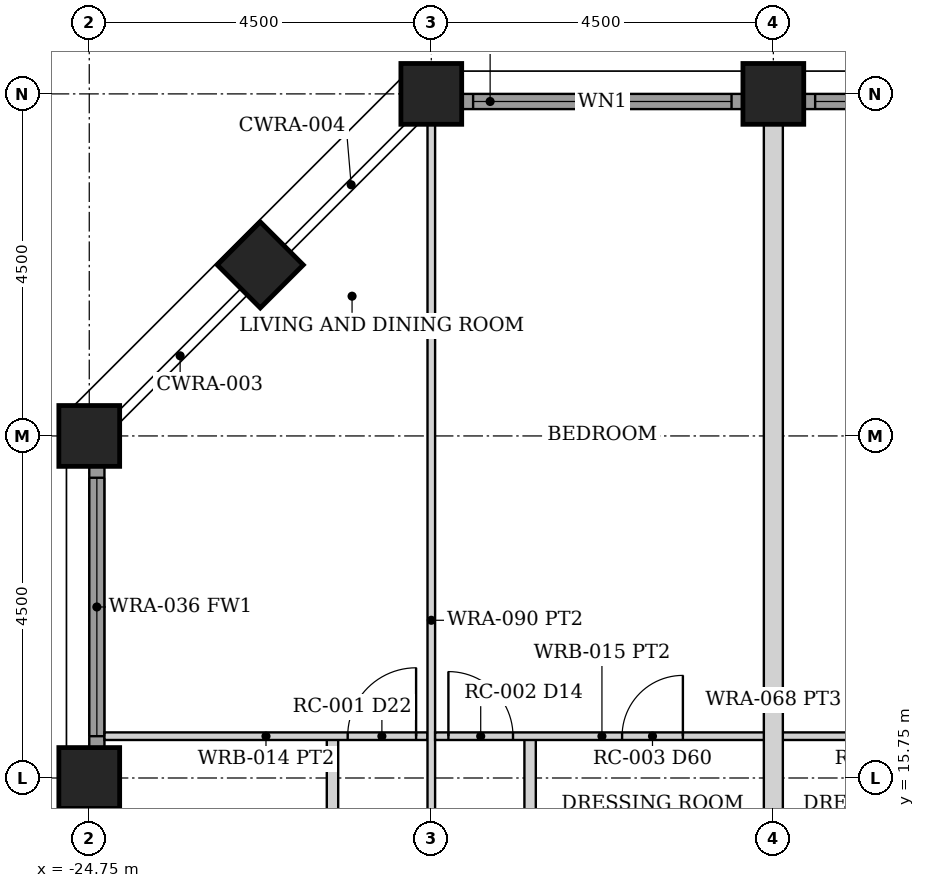
"""IFC4 building model, lengths in metres.
Left out: names, types, materials, properties, quantities, classifications, styles, units other than length and angle.
Written with IfcOpenShell. Run it as: python <this file> out.ifc"""

import sys

from ifc_helpers import new_model, si_unit, direction, frame, frame_2d, origin, origin_2d, place, context, subcontext, project, spatial, rectangle, hollow_rectangle, extrude, element, fill, save


model = new_model("IFC4")
c1 = context("Model", 3, precision=1e-05, world=origin(), true_north=direction((0.0, 1.0)))
c2 = subcontext(c1, "Body", "Model", "MODEL_VIEW")
j1 = project(units=[si_unit("LENGTHUNIT", "METRE"), si_unit("PLANEANGLEUNIT", "RADIAN")], contexts=[c1])
p1 = place(None, origin())
s1 = spatial("IfcSite", under=j1, at=p1, CompositionType="ELEMENT")
p2 = place(p1, origin())
s2 = spatial("IfcBuilding", under=s1, at=p2, CompositionType="ELEMENT")
p3 = place(p2, frame((0.0, 0.0, 47.5)))
s3 = spatial("IfcBuildingStorey", under=s2, at=p3, CompositionType="ELEMENT", Elevation=47.5)
for number, where, z_axis, x_axis in (
    (1, (-20.25, 24.75, 0.0), (0.0, 0.0, 1.0), (0.0, 1.0, 0.0)),
    (2, (-15.75, 24.75, 0.0), (0.0, 0.0, 1.0), (0.0, 1.0, 0.0)),
    (3, (-24.75, 15.75, 0.0), (0.0, 0.0, 1.0), (1.0, 0.0, 0.0)),
    (4, (-24.75, 20.25, 0.0), (0.0, 0.0, 1.0), (1.0, 0.0, 0.0)),
    (5, (-22.5, 22.5, 0.0), (0.0, 0.0, 1.0), (0.707, -0.707, 0.0)),
):
    element("IfcColumn", number, at=place(p3, frame(where, z_axis=z_axis, x_axis=x_axis)), inside=s3, PredefinedType="COLUMN", context=c2, shape_type="SweptSolid", body=[
        extrude(hollow_rectangle(XDim=0.8, YDim=0.8, WallThickness=0.07, at=origin_2d()), origin(), (0.0, 0.0, 1.0), 3.5),
    ])
p4 = place(p3, frame((-19.845, 24.65, 0.0), z_axis=(0.0, 0.0, 1.0), x_axis=(1.0, 0.0, 0.0)))
e6 = element("IfcWall", 6, at=p4, inside=s3, PredefinedType="SOLIDWALL", context=c2, shape_type="SweptSolid", body=[
    extrude(rectangle(XDim=3.69, YDim=0.2, at=frame_2d((1.845, 0.0))), origin(), (0.0, 0.0, 1.0), 2.379),
])
p5 = place(p4, frame((0.145, 0.0, 0.3)))
e7 = element("IfcOpeningElement", 7, at=p5, cuts=e6, PredefinedType="OPENING", context=c2, shape_type="SweptSolid", body=[
    extrude(rectangle(XDim=3.4, YDim=1.929, at=frame_2d((1.7, 0.964))), frame((0.0, 0.11, 0.0), z_axis=(0.0, -1.0, 0.0), x_axis=(1.0, 0.0, 0.0)), (0.0, 0.0, 1.0), 0.22),
])
p6 = place(p3, frame((-15.345, 24.65, 0.0), z_axis=(0.0, 0.0, 1.0), x_axis=(1.0, 0.0, 0.0)))
e8 = element("IfcWall", 8, at=p6, inside=s3, PredefinedType="SOLIDWALL", context=c2, shape_type="SweptSolid", body=[
    extrude(rectangle(XDim=3.69, YDim=0.2, at=frame_2d((1.845, 0.0))), origin(), (0.0, 0.0, 1.0), 2.379),
])
p7 = place(p6, frame((0.145, 0.0, 0.3)))
e9 = element("IfcOpeningElement", 9, at=p7, cuts=e8, PredefinedType="OPENING", context=c2, shape_type="SweptSolid", body=[
    extrude(rectangle(XDim=3.4, YDim=1.929, at=frame_2d((1.7, 0.964))), frame((0.0, 0.11, 0.0), z_axis=(0.0, -1.0, 0.0), x_axis=(1.0, 0.0, 0.0)), (0.0, 0.0, 1.0), 0.22),
])
p8 = place(p3, frame((-24.65, 16.155, 0.0), z_axis=(0.0, 0.0, 1.0), x_axis=(0.0, 1.0, 0.0)))
e10 = element("IfcWall", 10, at=p8, inside=s3, PredefinedType="SOLIDWALL", context=c2, shape_type="SweptSolid", body=[
    extrude(rectangle(XDim=3.69, YDim=0.2, at=frame_2d((1.845, 0.0))), origin(), (0.0, 0.0, 1.0), 2.379),
])
p9 = place(p8, frame((0.145, 0.0, 0.3)))
e11 = element("IfcOpeningElement", 11, at=p9, cuts=e10, PredefinedType="OPENING", context=c2, shape_type="SweptSolid", body=[
    extrude(rectangle(XDim=3.4, YDim=1.929, at=frame_2d((1.7, 0.964))), frame((0.0, 0.11, 0.0), z_axis=(0.0, -1.0, 0.0), x_axis=(1.0, 0.0, 0.0)), (0.0, 0.0, 1.0), 0.22),
])
p10 = place(p3, frame((-21.55, 11.3, 0.0), z_axis=(0.0, 0.0, 1.0), x_axis=(0.0, 1.0, 0.0)))
e12 = element("IfcWall", 12, at=p10, inside=s3, PredefinedType="PARTITIONING", context=c2, shape_type="SweptSolid", body=[
    extrude(rectangle(XDim=5.0, YDim=0.15, at=frame_2d((2.5, 0.0))), origin(), (0.0, 0.0, 1.0), 2.373),
])
p11 = place(p10, frame((2.05, 0.0, 0.0)))
e13 = element("IfcOpeningElement", 13, at=p11, cuts=e12, PredefinedType="OPENING", context=c2, shape_type="SweptSolid", body=[
    extrude(rectangle(XDim=0.9, YDim=2.1, at=frame_2d((0.45, 1.05))), frame((0.0, 0.085, 0.0), z_axis=(0.0, -1.0, 0.0), x_axis=(1.0, 0.0, 0.0)), (0.0, 0.0, 1.0), 0.17),
])
p12 = place(p3, frame((-24.55, 16.3, 0.0), z_axis=(0.0, 0.0, 1.0), x_axis=(1.0, 0.0, 0.0)))
e14 = element("IfcWall", 14, at=p12, inside=s3, PredefinedType="PARTITIONING", context=c2, shape_type="SweptSolid", body=[
    extrude(rectangle(XDim=4.25, YDim=0.1, at=frame_2d((2.125, 0.0))), origin(), (0.0, 0.0, 1.0), 2.373),
])
p13 = place(p12, frame((3.2, 0.0, 0.0)))
e15 = element("IfcOpeningElement", 15, at=p13, cuts=e14, PredefinedType="OPENING", context=c2, shape_type="SweptSolid", body=[
    extrude(rectangle(XDim=0.9, YDim=2.1, at=frame_2d((0.45, 1.05))), frame((0.0, 0.06, 0.0), z_axis=(0.0, -1.0, 0.0), x_axis=(1.0, 0.0, 0.0)), (0.0, 0.0, 1.0), 0.12),
])
p14 = place(p3, frame((-20.25, 11.3, 0.0), z_axis=(0.0, 0.0, 1.0), x_axis=(0.0, 1.0, 0.0)))
e16 = element("IfcWall", 16, at=p14, inside=s3, PredefinedType="PARTITIONING", context=c2, shape_type="SweptSolid", body=[
    extrude(rectangle(XDim=13.05, YDim=0.1, at=frame_2d((6.525, 0.0))), origin(), (0.0, 0.0, 1.0), 2.373),
])
p15 = place(p3, frame((-18.95, 11.3, 0.0), z_axis=(0.0, 0.0, 1.0), x_axis=(0.0, 1.0, 0.0)))
e17 = element("IfcWall", 17, at=p15, inside=s3, PredefinedType="PARTITIONING", context=c2, shape_type="SweptSolid", body=[
    extrude(rectangle(XDim=5.0, YDim=0.15, at=frame_2d((2.5, 0.0))), origin(), (0.0, 0.0, 1.0), 2.373),
])
p16 = place(p15, frame((0.85, 0.0, 0.0)))
e18 = element("IfcOpeningElement", 18, at=p16, cuts=e17, PredefinedType="OPENING", context=c2, shape_type="SweptSolid", body=[
    extrude(rectangle(XDim=0.9, YDim=2.1, at=frame_2d((0.45, 1.05))), frame((0.0, 0.085, 0.0), z_axis=(0.0, -1.0, 0.0), x_axis=(1.0, 0.0, 0.0)), (0.0, 0.0, 1.0), 0.17),
])
p17 = place(p3, frame((-20.2, 16.3, 0.0), z_axis=(0.0, 0.0, 1.0), x_axis=(1.0, 0.0, 0.0)))
e19 = element("IfcWall", 19, at=p17, inside=s3, PredefinedType="PARTITIONING", context=c2, shape_type="SweptSolid", body=[
    extrude(rectangle(XDim=4.39, YDim=0.1, at=frame_2d((2.195, 0.0))), origin(), (0.0, 0.0, 1.0), 2.373),
])
p18 = place(p17, frame((0.175, 0.0, 0.0)))
e20 = element("IfcOpeningElement", 20, at=p18, cuts=e19, PredefinedType="OPENING", context=c2, shape_type="SweptSolid", body=[
    extrude(rectangle(XDim=0.85, YDim=2.1, at=frame_2d((0.425, 1.05))), frame((0.0, 0.06, 0.0), z_axis=(0.0, -1.0, 0.0), x_axis=(1.0, 0.0, 0.0)), (0.0, 0.0, 1.0), 0.12),
])
p19 = place(p17, frame((2.46, 0.0, 0.0)))
e21 = element("IfcOpeningElement", 21, at=p19, cuts=e19, PredefinedType="OPENING", context=c2, shape_type="SweptSolid", body=[
    extrude(rectangle(XDim=0.8, YDim=2.1, at=frame_2d((0.4, 1.05))), frame((0.0, 0.06, 0.0), z_axis=(0.0, -1.0, 0.0), x_axis=(1.0, 0.0, 0.0)), (0.0, 0.0, 1.0), 0.12),
])
p20 = place(p3, frame((-15.69, 16.3, 0.0), z_axis=(0.0, 0.0, 1.0), x_axis=(1.0, 0.0, 0.0)))
e22 = element("IfcWall", 22, at=p20, inside=s3, PredefinedType="PARTITIONING", context=c2, shape_type="SweptSolid", body=[
    extrude(rectangle(XDim=4.39, YDim=0.1, at=frame_2d((2.195, 0.0))), origin(), (0.0, 0.0, 1.0), 2.373),
])
p21 = place(p20, frame((3.365, 0.0, 0.0)))
e23 = element("IfcOpeningElement", 23, at=p21, cuts=e22, PredefinedType="OPENING", context=c2, shape_type="SweptSolid", body=[
    extrude(rectangle(XDim=0.85, YDim=2.1, at=frame_2d((0.425, 1.05))), frame((0.0, 0.06, 0.0), z_axis=(0.0, -1.0, 0.0), x_axis=(1.0, 0.0, 0.0)), (0.0, 0.0, 1.0), 0.12),
])
p22 = place(p20, frame((1.13, 0.0, 0.0)))
e24 = element("IfcOpeningElement", 24, at=p22, cuts=e22, PredefinedType="OPENING", context=c2, shape_type="SweptSolid", body=[
    extrude(rectangle(XDim=0.8, YDim=2.1, at=frame_2d((0.4, 1.05))), frame((0.0, 0.06, 0.0), z_axis=(0.0, -1.0, 0.0), x_axis=(1.0, 0.0, 0.0)), (0.0, 0.0, 1.0), 0.12),
])
p23 = place(p3, frame((-15.75, 9.2, 0.0), z_axis=(0.0, 0.0, 1.0), x_axis=(0.0, 1.0, 0.0)))
e25 = element("IfcWall", 25, at=p23, inside=s3, PredefinedType="PARTITIONING", context=c2, shape_type="SweptSolid", body=[
    extrude(rectangle(XDim=15.15, YDim=0.25, at=frame_2d((7.575, 0.0))), origin(), (0.0, 0.0, 1.0), 2.373),
])
p24 = place(p5, origin())
e26 = element("IfcWindow", 26, at=p24, inside=s3, PartitioningType="SINGLE_PANEL", PredefinedType="WINDOW", context=c2, shape_type="SweptSolid", body=[
    extrude(rectangle(XDim=3.4, YDim=1.929, at=frame_2d((1.7, 0.964))), frame((0.0, 0.03, 0.0), z_axis=(0.0, -1.0, 0.0), x_axis=(1.0, 0.0, 0.0)), (0.0, 0.0, 1.0), 0.06),
])
fill(e7, e26)
p25 = place(p7, origin())
e27 = element("IfcWindow", 27, at=p25, inside=s3, PartitioningType="SINGLE_PANEL", PredefinedType="WINDOW", context=c2, shape_type="SweptSolid", body=[
    extrude(rectangle(XDim=3.4, YDim=1.929, at=frame_2d((1.7, 0.964))), frame((0.0, 0.03, 0.0), z_axis=(0.0, -1.0, 0.0), x_axis=(1.0, 0.0, 0.0)), (0.0, 0.0, 1.0), 0.06),
])
fill(e9, e27)
p26 = place(p9, origin())
e28 = element("IfcWindow", 28, at=p26, inside=s3, PartitioningType="SINGLE_PANEL", PredefinedType="WINDOW", context=c2, shape_type="SweptSolid", body=[
    extrude(rectangle(XDim=3.4, YDim=1.929, at=frame_2d((1.7, 0.964))), frame((0.0, 0.03, 0.0), z_axis=(0.0, -1.0, 0.0), x_axis=(1.0, 0.0, 0.0)), (0.0, 0.0, 1.0), 0.06),
])
fill(e11, e28)
p27 = place(p13, origin())
e29 = element("IfcDoor", 29, at=p27, inside=s3, OperationType="SINGLE_SWING_RIGHT", PredefinedType="DOOR", context=c2, shape_type="SweptSolid", body=[
    extrude(rectangle(XDim=0.9, YDim=2.1, at=frame_2d((0.45, 1.05))), frame((0.0, 0.025, 0.0), z_axis=(0.0, -1.0, 0.0), x_axis=(1.0, 0.0, 0.0)), (0.0, 0.0, 1.0), 0.05),
])
fill(e15, e29)
p28 = place(p18, origin())
e30 = element("IfcDoor", 30, at=p28, inside=s3, OperationType="SINGLE_SWING_LEFT", PredefinedType="DOOR", context=c2, shape_type="SweptSolid", body=[
    extrude(rectangle(XDim=0.85, YDim=2.1, at=frame_2d((0.425, 1.05))), frame((0.0, 0.025, 0.0), z_axis=(0.0, -1.0, 0.0), x_axis=(1.0, 0.0, 0.0)), (0.0, 0.0, 1.0), 0.05),
])
fill(e20, e30)
p29 = place(p19, origin())
e31 = element("IfcDoor", 31, at=p29, inside=s3, OperationType="SINGLE_SWING_RIGHT", PredefinedType="DOOR", context=c2, shape_type="SweptSolid", body=[
    extrude(rectangle(XDim=0.8, YDim=2.1, at=frame_2d((0.4, 1.05))), frame((0.0, 0.025, 0.0), z_axis=(0.0, -1.0, 0.0), x_axis=(1.0, 0.0, 0.0)), (0.0, 0.0, 1.0), 0.05),
])
fill(e21, e31)
save(model, sys.argv[1])
